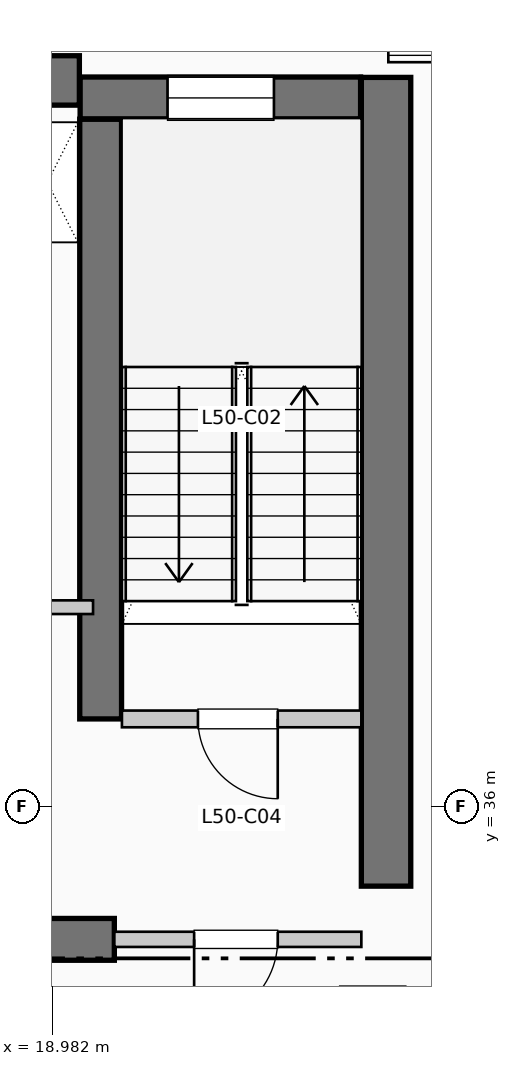
"""IFC4 building model, lengths in metres.
Left out: names, types, materials, properties, quantities, classifications, styles, units other than length and angle.
Written with IfcOpenShell. Run it as: python <this file> out.ifc"""

import sys

from ifc_helpers import new_model, si_unit, direction, frame, frame_2d, origin, place, context, subcontext, project, spatial, rectangle, extrude, element, fill, save


model = new_model("IFC4")
c1 = context("Model", 3, precision=1e-05, world=origin(), true_north=direction((0.0, 1.0)))
c2 = subcontext(c1, "Body", "Model", "MODEL_VIEW")
j1 = project(units=[si_unit("LENGTHUNIT", "METRE"), si_unit("PLANEANGLEUNIT", "RADIAN")], contexts=[c1])
p1 = place(None, origin())
s1 = spatial("IfcSite", under=j1, at=p1, CompositionType="ELEMENT")
p2 = place(p1, origin())
s2 = spatial("IfcBuilding", under=s1, at=p2, CompositionType="ELEMENT")
p3 = place(p2, frame((0.0, 0.0, 207.24)))
s3 = spatial("IfcBuildingStorey", under=s2, at=p3, CompositionType="ELEMENT", Elevation=207.24)
p4 = place(p3, frame((5.36, 45.55, 0.0), z_axis=(0.0, 0.0, 1.0), x_axis=(1.0, 0.0, 0.0)))
e1 = element("IfcWall", 1, at=p4, inside=s3, PredefinedType="SHEAR", context=c2, shape_type="SweptSolid", body=[
    extrude(rectangle(XDim=13.98, YDim=0.65, at=frame_2d((6.99, 0.0))), origin(), (0.0, 0.0, 1.0), 3.96),
])
p5 = place(p3, frame((23.375, 34.95, 0.0), z_axis=(0.0, 0.0, 1.0), x_axis=(0.0, 1.0, 0.0)))
e2 = element("IfcWall", 2, at=p5, inside=s3, PredefinedType="SHEAR", context=c2, shape_type="SweptSolid", body=[
    extrude(rectangle(XDim=10.64, YDim=0.65, at=frame_2d((5.32, 0.0))), origin(), (0.0, 0.0, 1.0), 3.96),
])
p6 = place(p3, frame((13.68, 34.25, 0.0), z_axis=(0.0, 0.0, 1.0), x_axis=(1.0, 0.0, 0.0)))
e3 = element("IfcWall", 3, at=p6, inside=s3, PredefinedType="SHEAR", context=c2, shape_type="SweptSolid", body=[
    extrude(rectangle(XDim=6.12, YDim=0.55, at=frame_2d((3.06, 0.0))), origin(), (0.0, 0.0, 1.0), 3.96),
])
p7 = place(p3, frame((19.62, 37.15, 0.0), z_axis=(0.0, 0.0, 1.0), x_axis=(0.0, 1.0, 0.0)))
e4 = element("IfcWall", 4, at=p7, inside=s3, PredefinedType="SHEAR", context=c2, shape_type="SweptSolid", body=[
    extrude(rectangle(XDim=7.89, YDim=0.55, at=frame_2d((3.945, 0.0))), origin(), (0.0, 0.0, 1.0), 3.96),
])
p8 = place(p3, frame((19.35, 45.32, 0.0), z_axis=(0.0, 0.0, 1.0), x_axis=(1.0, 0.0, 0.0)))
e5 = element("IfcWall", 5, at=p8, inside=s3, PredefinedType="SHEAR", context=c2, shape_type="SweptSolid", body=[
    extrude(rectangle(XDim=3.69, YDim=0.55, at=frame_2d((1.845, 0.0))), origin(), (0.0, 0.0, 1.0), 3.96),
])
p9 = place(p8, frame((1.15, 0.0, 1.05)))
e6 = element("IfcOpeningElement", 6, at=p9, cuts=e5, PredefinedType="OPENING", context=c2, shape_type="SweptSolid", body=[
    extrude(rectangle(XDim=1.4, YDim=1.8, at=frame_2d((0.7, 0.9))), frame((0.0, 0.285, 0.0), z_axis=(0.0, -1.0, 0.0), x_axis=(1.0, 0.0, 0.0)), (0.0, 0.0, 1.0), 0.57),
])
p10 = place(p3, frame((19.9, 37.15, 0.0), z_axis=(0.0, 0.0, 1.0), x_axis=(1.0, 0.0, 0.0)))
e7 = element("IfcWall", 7, at=p10, inside=s3, PredefinedType="PARTITIONING", context=c2, shape_type="SweptSolid", body=[
    extrude(rectangle(XDim=3.15, YDim=0.22, at=frame_2d((1.575, 0.0))), origin(), (0.0, 0.0, 1.0), 3.71),
])
p11 = place(p10, frame((2.05, 0.0, 0.0), z_axis=(0.0, 0.0, 1.0), x_axis=(-1.0, 0.0, 0.0)))
e8 = element("IfcOpeningElement", 8, at=p11, cuts=e7, PredefinedType="OPENING", context=c2, shape_type="SweptSolid", body=[
    extrude(rectangle(XDim=1.05, YDim=2.15, at=frame_2d((0.525, 1.075))), frame((0.0, 0.12, 0.0), z_axis=(0.0, -1.0, 0.0), x_axis=(1.0, 0.0, 0.0)), (0.0, 0.0, 1.0), 0.24),
])
p12 = place(p3, frame((19.8, 34.25, 0.0), z_axis=(0.0, 0.0, 1.0), x_axis=(1.0, 0.0, 0.0)))
e9 = element("IfcWall", 9, at=p12, inside=s3, PredefinedType="PARTITIONING", context=c2, shape_type="SweptSolid", body=[
    extrude(rectangle(XDim=3.25, YDim=0.2, at=frame_2d((1.625, 0.0))), origin(), (0.0, 0.0, 1.0), 3.71),
])
p13 = place(p12, frame((2.15, 0.0, 0.0), z_axis=(0.0, 0.0, 1.0), x_axis=(-1.0, 0.0, 0.0)))
e10 = element("IfcOpeningElement", 10, at=p13, cuts=e9, PredefinedType="OPENING", context=c2, shape_type="SweptSolid", body=[
    extrude(rectangle(XDim=1.1, YDim=2.15, at=frame_2d((0.55, 1.075))), frame((0.0, 0.11, 0.0), z_axis=(0.0, -1.0, 0.0), x_axis=(1.0, 0.0, 0.0)), (0.0, 0.0, 1.0), 0.22),
])
p14 = place(p3, frame((17.68, 38.62, 0.0), z_axis=(0.0, 0.0, 1.0), x_axis=(1.0, 0.0, 0.0)))
e11 = element("IfcWall", 11, at=p14, inside=s3, PredefinedType="PARTITIONING", context=c2, shape_type="SweptSolid", body=[
    extrude(rectangle(XDim=1.84, YDim=0.18, at=frame_2d((0.92, 0.0))), origin(), (0.0, 0.0, 1.0), 3.71),
])
p15 = place(p14, frame((0.24, 0.0, 0.0)))
e12 = element("IfcOpeningElement", 12, at=p15, cuts=e11, PredefinedType="OPENING", context=c2, shape_type="SweptSolid", body=[
    extrude(rectangle(XDim=0.92, YDim=2.1, at=frame_2d((0.46, 1.05))), frame((0.0, 0.1, 0.0), z_axis=(0.0, -1.0, 0.0), x_axis=(1.0, 0.0, 0.0)), (0.0, 0.0, 1.0), 0.2),
])
p16 = place(p9, origin())
e13 = element("IfcWindow", 13, at=p16, inside=s3, PartitioningType="SINGLE_PANEL", PredefinedType="WINDOW", context=c2, shape_type="SweptSolid", body=[
    extrude(rectangle(XDim=1.4, YDim=1.8, at=frame_2d((0.7, 0.9))), frame((0.0, 0.03, 0.0), z_axis=(0.0, -1.0, 0.0), x_axis=(1.0, 0.0, 0.0)), (0.0, 0.0, 1.0), 0.06),
])
fill(e6, e13)
p17 = place(p11, origin())
e14 = element("IfcDoor", 14, at=p17, inside=s3, OperationType="SINGLE_SWING_RIGHT", PredefinedType="DOOR", context=c2, shape_type="SweptSolid", body=[
    extrude(rectangle(XDim=1.05, YDim=2.15, at=frame_2d((0.525, 1.075))), frame((0.0, 0.025, 0.0), z_axis=(0.0, -1.0, 0.0), x_axis=(1.0, 0.0, 0.0)), (0.0, 0.0, 1.0), 0.05),
])
fill(e8, e14)
p18 = place(p13, origin())
e15 = element("IfcDoor", 15, at=p18, inside=s3, OperationType="SINGLE_SWING_LEFT", PredefinedType="DOOR", context=c2, shape_type="SweptSolid", body=[
    extrude(rectangle(XDim=1.1, YDim=2.15, at=frame_2d((0.55, 1.075))), frame((0.0, 0.025, 0.0), z_axis=(0.0, -1.0, 0.0), x_axis=(1.0, 0.0, 0.0)), (0.0, 0.0, 1.0), 0.05),
])
fill(e10, e15)
save(model, sys.argv[1])
